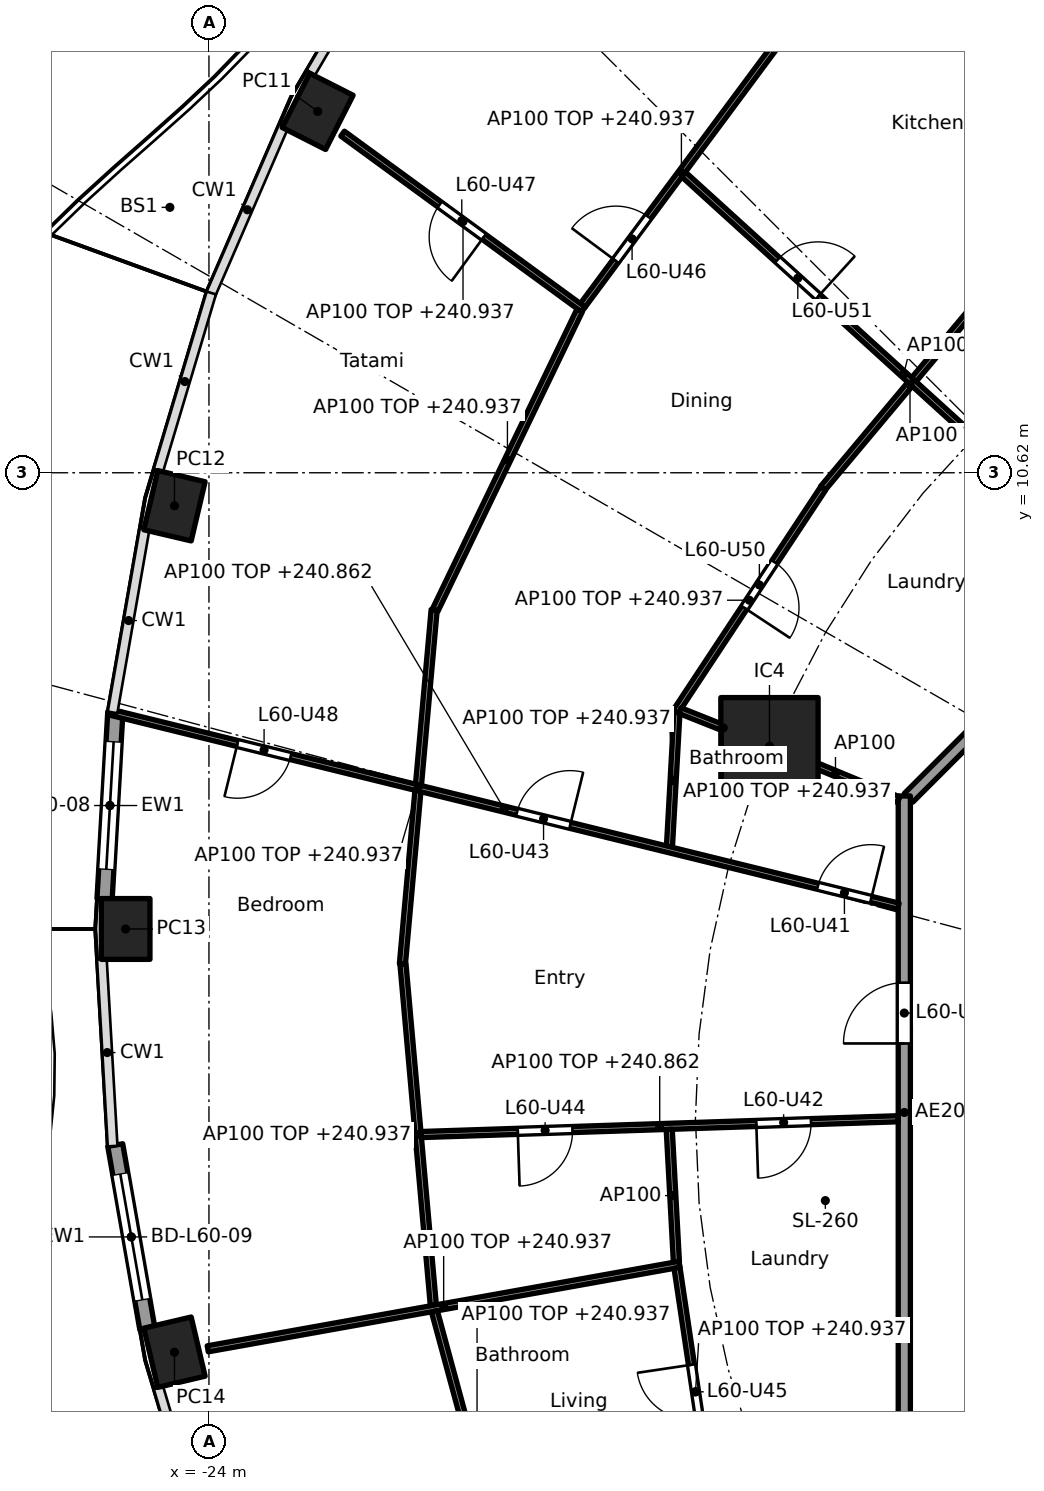
"""IFC4 building model, lengths in metres.
Left out: names, types, materials, properties, quantities, classifications, styles, units other than length and angle.
Written with IfcOpenShell. Run it as: python <this file> out.ifc"""

import sys

from ifc_helpers import new_model, si_unit, direction, frame, frame_2d, origin, origin_2d, place, context, subcontext, project, spatial, rectangle, hollow_rectangle, extrude, element, fill, save


model = new_model("IFC4")
c1 = context("Model", 3, precision=1e-05, world=origin(), true_north=direction((0.0, 1.0)))
c2 = subcontext(c1, "Body", "Model", "MODEL_VIEW")
j1 = project(units=[si_unit("LENGTHUNIT", "METRE"), si_unit("PLANEANGLEUNIT", "RADIAN")], contexts=[c1])
p1 = place(None, origin())
s1 = spatial("IfcSite", under=j1, at=p1, CompositionType="ELEMENT")
p2 = place(p1, origin())
s2 = spatial("IfcBuilding", under=s1, at=p2, CompositionType="ELEMENT")
p3 = place(p2, frame((0.0, 0.0, 238.1)))
s3 = spatial("IfcBuildingStorey", under=s2, at=p3, CompositionType="ELEMENT", Elevation=238.1)
for number, where, z_axis, x_axis in (
    (1, (-22.212, 16.563, 0.0), (0.0, 0.0, 1.0), (-0.452, -0.892, 0.0)),
    (2, (-24.567, 10.077, 0.0), (0.0, 0.0, 1.0), (-0.229, -0.973, 0.0)),
    (3, (-25.37, 3.118, 0.0), (0.0, 0.0, 1.0), (0.0, -1.0, 0.0)),
    (4, (-24.567, -3.842, 0.0), (0.0, 0.0, 1.0), (0.229, -0.973, 0.0)),
):
    element("IfcColumn", number, at=place(p3, frame(where, z_axis=z_axis, x_axis=x_axis)), inside=s3, PredefinedType="COLUMN", context=c2, shape_type="SweptSolid", body=[
        extrude(hollow_rectangle(XDim=1.0, YDim=0.8, WallThickness=0.032, at=origin_2d()), origin(), (0.0, 0.0, 1.0), 3.7),
    ])
p4 = place(p3, frame((-14.782, 6.123, 0.0), z_axis=(0.0, 0.0, 1.0), x_axis=(1.0, 0.0, 0.0)))
e5 = element("IfcColumn", 5, at=p4, inside=s3, PredefinedType="COLUMN", context=c2, shape_type="SweptSolid", body=[
    extrude(rectangle(XDim=1.6, YDim=1.6, at=origin_2d()), origin(), (0.0, 0.0, 1.0), 3.7),
])
p5 = place(p3, frame((-25.717, 3.61, 0.0), z_axis=(0.0, 0.0, 1.0), x_axis=(0.057528189427, 0.998343882348, 0.0)))
e6 = element("IfcWall", 6, at=p5, inside=s3, PredefinedType="SOLIDWALL", context=c2, shape_type="SweptSolid", body=[
    extrude(rectangle(XDim=3.081, YDim=0.25, at=frame_2d((1.541, 0.0))), origin(), (0.0, 0.0, 1.0), 3.44),
])
p6 = place(p5, frame((0.49, 0.0, 0.0)))
e7 = element("IfcOpeningElement", 7, at=p6, cuts=e6, PredefinedType="OPENING", context=c2, shape_type="SweptSolid", body=[
    extrude(rectangle(XDim=2.1, YDim=2.4, at=frame_2d((1.05, 1.2))), frame((0.0, 0.135, 0.0), z_axis=(0.0, -1.0, 0.0), x_axis=(1.0, 0.0, 0.0)), (0.0, 0.0, 1.0), 0.27),
])
p7 = place(p3, frame((-25.013, -3.457, 0.0), z_axis=(0.0, 0.0, 1.0), x_axis=(-0.172241318156, 0.985054784426, 0.0)))
e8 = element("IfcWall", 8, at=p7, inside=s3, PredefinedType="SOLIDWALL", context=c2, shape_type="SweptSolid", body=[
    extrude(rectangle(XDim=3.067, YDim=0.25, at=frame_2d((1.534, 0.0))), origin(), (0.0, 0.0, 1.0), 3.44),
])
p8 = place(p7, frame((0.484, 0.0, 0.0)))
e9 = element("IfcOpeningElement", 9, at=p8, cuts=e8, PredefinedType="OPENING", context=c2, shape_type="SweptSolid", body=[
    extrude(rectangle(XDim=2.1, YDim=2.4, at=frame_2d((1.05, 1.2))), frame((0.0, 0.135, 0.0), z_axis=(0.0, -1.0, 0.0), x_axis=(1.0, 0.0, 0.0)), (0.0, 0.0, 1.0), 0.27),
])
p9 = place(p3, frame((-6.15, 14.824, 0.0), z_axis=(0.0, 0.0, 1.0), x_axis=(-0.538870687577, 0.842388498301, 0.0)))
e10 = element("IfcWall", 10, at=p9, inside=s3, PredefinedType="PARTITIONING", context=c2, shape_type="SweptSolid", body=[
    extrude(rectangle(XDim=13.213, YDim=0.2, at=frame_2d((6.606, 0.0))), origin(), (0.0, 0.0, 1.0), 2.837),
])
p10 = place(p3, frame((-5.275, 12.494, 0.0), z_axis=(0.0, 0.0, 1.0), x_axis=(-0.707106781187, -0.707106781187, 0.0)))
e11 = element("IfcWall", 11, at=p10, inside=s3, PredefinedType="PARTITIONING", context=c2, shape_type="SweptSolid", body=[
    extrude(rectangle(XDim=10.209, YDim=0.2, at=frame_2d((5.104, 0.0))), origin(), (0.0, 0.0, 1.0), 3.44),
])
p11 = place(p3, frame((-12.565, 5.304, 0.0), z_axis=(0.0, 0.0, 1.0), x_axis=(0.0, -1.0, 0.0)))
e12 = element("IfcWall", 12, at=p11, inside=s3, PredefinedType="PARTITIONING", context=c2, shape_type="SweptSolid", body=[
    extrude(rectangle(XDim=10.409, YDim=0.2, at=frame_2d((5.205, 0.0))), origin(), (0.0, 0.0, 1.0), 3.44),
])
p12 = place(p11, frame((3.07, 0.0, 0.0)))
e13 = element("IfcOpeningElement", 13, at=p12, cuts=e12, PredefinedType="OPENING", context=c2, shape_type="SweptSolid", body=[
    extrude(rectangle(XDim=1.0, YDim=2.1, at=frame_2d((0.5, 1.05))), frame((0.0, 0.11, 0.0), z_axis=(0.0, -1.0, 0.0), x_axis=(1.0, 0.0, 0.0)), (0.0, 0.0, 1.0), 0.22),
])
p13 = place(p3, frame((-11.039, 13.785, 0.0), z_axis=(0.0, 0.0, 1.0), x_axis=(-0.642254625966, -0.766491353784, 0.0)))
e14 = element("IfcWall", 14, at=p13, inside=s3, PredefinedType="PARTITIONING", context=c2, shape_type="SweptSolid", body=[
    extrude(rectangle(XDim=4.461, YDim=0.1, at=frame_2d((2.23, 0.0))), origin(), (0.0, 0.0, 1.0), 2.837),
])
p14 = place(p3, frame((-14.608, 17.743, 0.0), z_axis=(0.0, 0.0, 1.0), x_axis=(-0.596174489482, -0.8028548923, 0.0)))
e15 = element("IfcWall", 15, at=p14, inside=s3, PredefinedType="PARTITIONING", context=c2, shape_type="SweptSolid", body=[
    extrude(rectangle(XDim=5.442, YDim=0.1, at=frame_2d((2.721, 0.0))), origin(), (0.0, 0.0, 1.0), 2.837),
])
p15 = place(p14, frame((3.631, 0.0, 0.0)))
e16 = element("IfcOpeningElement", 16, at=p15, cuts=e15, PredefinedType="OPENING", context=c2, shape_type="SweptSolid", body=[
    extrude(rectangle(XDim=0.9, YDim=2.1, at=frame_2d((0.45, 1.05))), frame((0.0, 0.06, 0.0), z_axis=(0.0, -1.0, 0.0), x_axis=(1.0, 0.0, 0.0)), (0.0, 0.0, 1.0), 0.12),
])
p16 = place(p3, frame((-8.959, 8.952, 0.0), z_axis=(0.0, 0.0, 1.0), x_axis=(-0.740140081805, 0.672452719011, 0.0)))
e17 = element("IfcWall", 17, at=p16, inside=s3, PredefinedType="PARTITIONING", context=c2, shape_type="SweptSolid", body=[
    extrude(rectangle(XDim=9.775, YDim=0.1, at=frame_2d((4.887, 0.0))), origin(), (0.0, 0.0, 1.0), 2.762),
])
p17 = place(p16, frame((6.789, 0.0, 0.0)))
e18 = element("IfcOpeningElement", 18, at=p17, cuts=e17, PredefinedType="OPENING", context=c2, shape_type="SweptSolid", body=[
    extrude(rectangle(XDim=0.9, YDim=2.1, at=frame_2d((0.45, 1.05))), frame((0.0, 0.06, 0.0), z_axis=(0.0, -1.0, 0.0), x_axis=(1.0, 0.0, 0.0)), (0.0, 0.0, 1.0), 0.12),
])
p18 = place(p3, frame((-13.899, 10.363, 0.0), z_axis=(0.0, 0.0, 1.0), x_axis=(-0.55129513787, -0.834310296569, 0.0)))
e19 = element("IfcWall", 19, at=p18, inside=s3, PredefinedType="PARTITIONING", context=c2, shape_type="SweptSolid", body=[
    extrude(rectangle(XDim=4.407, YDim=0.1, at=frame_2d((2.204, 0.0))), origin(), (0.0, 0.0, 1.0), 2.837),
])
p19 = place(p18, frame((1.453, 0.0, 0.0)))
e20 = element("IfcOpeningElement", 20, at=p19, cuts=e19, PredefinedType="OPENING", context=c2, shape_type="SweptSolid", body=[
    extrude(rectangle(XDim=0.9, YDim=2.1, at=frame_2d((0.45, 1.05))), frame((0.0, 0.06, 0.0), z_axis=(0.0, -1.0, 0.0), x_axis=(1.0, 0.0, 0.0)), (0.0, 0.0, 1.0), 0.12),
])
p20 = place(p3, frame((-17.842, 13.304, 0.0), z_axis=(0.0, 0.0, 1.0), x_axis=(-0.807541617862, 0.589810592835, 0.0)))
e21 = element("IfcWall", 21, at=p20, inside=s3, PredefinedType="PARTITIONING", context=c2, shape_type="SweptSolid", body=[
    extrude(rectangle(XDim=4.903, YDim=0.1, at=frame_2d((2.452, 0.0))), origin(), (0.0, 0.0, 1.0), 2.837),
])
p21 = place(p20, frame((2.027, 0.0, 0.0)))
e22 = element("IfcOpeningElement", 22, at=p21, cuts=e21, PredefinedType="OPENING", context=c2, shape_type="SweptSolid", body=[
    extrude(rectangle(XDim=0.9, YDim=2.1, at=frame_2d((0.45, 1.05))), frame((0.0, 0.06, 0.0), z_axis=(0.0, -1.0, 0.0), x_axis=(1.0, 0.0, 0.0)), (0.0, 0.0, 1.0), 0.12),
])
p22 = place(p3, frame((-17.904, 13.289, 0.0), z_axis=(0.0, 0.0, 1.0), x_axis=(-0.434292070406, -0.900772111903, 0.0)))
e23 = element("IfcWall", 23, at=p22, inside=s3, PredefinedType="PARTITIONING", context=c2, shape_type="SweptSolid", body=[
    extrude(rectangle(XDim=5.469, YDim=0.1, at=frame_2d((2.734, 0.0))), origin(), (0.0, 0.0, 1.0), 2.837),
])
p23 = place(p3, frame((-12.657, 5.243, 0.0), z_axis=(0.0, 0.0, 1.0), x_axis=(-0.923864733477, 0.382719158442, 0.0)))
e24 = element("IfcWall", 24, at=p23, inside=s3, PredefinedType="PARTITIONING", context=c2, shape_type="SweptSolid", body=[
    extrude(rectangle(XDim=2.25, YDim=0.1, at=frame_2d((1.125, 0.0))), origin(), (0.0, 0.0, 1.0), 3.44),
])
p24 = place(p3, frame((-14.829, 6.141, 0.0), z_axis=(0.0, 0.0, 1.0), x_axis=(-0.929177051194, 0.369634965248, 0.0)))
e25 = element("IfcWall", 25, at=p24, inside=s3, PredefinedType="PARTITIONING", context=c2, shape_type="SweptSolid", body=[
    extrude(rectangle(XDim=1.535, YDim=0.1, at=frame_2d((0.768, 0.0))), origin(), (0.0, 0.0, 1.0), 2.837),
])
p25 = place(p3, frame((-16.304, 6.677, 0.0), z_axis=(0.0, 0.0, 1.0), x_axis=(-0.055638870195, -0.998450958297, 0.0)))
e26 = element("IfcWall", 26, at=p25, inside=s3, PredefinedType="PARTITIONING", context=c2, shape_type="SweptSolid", body=[
    extrude(rectangle(XDim=2.242, YDim=0.1, at=frame_2d((1.121, 0.0))), origin(), (0.0, 0.0, 1.0), 2.837),
])
p26 = place(p3, frame((-20.296, 8.368, 0.0), z_axis=(0.0, 0.0, 1.0), x_axis=(-0.08928986402, -0.996005682807, 0.0)))
e27 = element("IfcWall", 27, at=p26, inside=s3, PredefinedType="PARTITIONING", context=c2, shape_type="SweptSolid", body=[
    extrude(rectangle(XDim=5.849, YDim=0.1, at=frame_2d((2.924, 0.0))), origin(), (0.0, 0.0, 1.0), 2.837),
])
p27 = place(p3, frame((-12.662, 3.494, 0.0), z_axis=(0.0, 0.0, 1.0), x_axis=(-0.971037272035, 0.238928056784, 0.0)))
e28 = element("IfcWall", 28, at=p27, inside=s3, PredefinedType="PARTITIONING", context=c2, shape_type="SweptSolid", body=[
    extrude(rectangle(XDim=13.35, YDim=0.1, at=frame_2d((6.675, 0.0))), origin(), (0.0, 0.0, 1.0), 2.762),
])
p28 = place(p27, frame((0.464, 0.0, 0.0)))
e29 = element("IfcOpeningElement", 29, at=p28, cuts=e28, PredefinedType="OPENING", context=c2, shape_type="SweptSolid", body=[
    extrude(rectangle(XDim=0.9, YDim=2.1, at=frame_2d((0.45, 1.05))), frame((0.0, 0.06, 0.0), z_axis=(0.0, -1.0, 0.0), x_axis=(1.0, 0.0, 0.0)), (0.0, 0.0, 1.0), 0.12),
])
p29 = place(p27, frame((5.56, 0.0, 0.0)))
e30 = element("IfcOpeningElement", 30, at=p29, cuts=e28, PredefinedType="OPENING", context=c2, shape_type="SweptSolid", body=[
    extrude(rectangle(XDim=0.9, YDim=2.1, at=frame_2d((0.45, 1.05))), frame((0.0, 0.06, 0.0), z_axis=(0.0, -1.0, 0.0), x_axis=(1.0, 0.0, 0.0)), (0.0, 0.0, 1.0), 0.12),
])
p30 = place(p27, frame((10.293, 0.0, 0.0)))
e31 = element("IfcOpeningElement", 31, at=p30, cuts=e28, PredefinedType="OPENING", context=c2, shape_type="SweptSolid", body=[
    extrude(rectangle(XDim=0.9, YDim=2.1, at=frame_2d((0.45, 1.05))), frame((0.0, 0.06, 0.0), z_axis=(0.0, -1.0, 0.0), x_axis=(1.0, 0.0, 0.0)), (0.0, 0.0, 1.0), 0.12),
])
p31 = place(p3, frame((-20.81, 2.542, 0.0), z_axis=(0.0, 0.0, 1.0), x_axis=(0.088621920298, -0.996065336834, 0.0)))
e32 = element("IfcWall", 32, at=p31, inside=s3, PredefinedType="PARTITIONING", context=c2, shape_type="SweptSolid", body=[
    extrude(rectangle(XDim=5.636, YDim=0.1, at=frame_2d((2.818, 0.0))), origin(), (0.0, 0.0, 1.0), 2.837),
])
p32 = place(p3, frame((-12.665, -0.003, 0.0), z_axis=(0.0, 0.0, 1.0), x_axis=(-0.999453263957, -0.033063169315, 0.0)))
e33 = element("IfcWall", 33, at=p32, inside=s3, PredefinedType="PARTITIONING", context=c2, shape_type="SweptSolid", body=[
    extrude(rectangle(XDim=7.849, YDim=0.1, at=frame_2d((3.925, 0.0))), origin(), (0.0, 0.0, 1.0), 2.762),
])
p33 = place(p32, frame((1.435, 0.0, 0.0)))
e34 = element("IfcOpeningElement", 34, at=p33, cuts=e33, PredefinedType="OPENING", context=c2, shape_type="SweptSolid", body=[
    extrude(rectangle(XDim=0.9, YDim=2.1, at=frame_2d((0.45, 1.05))), frame((0.0, 0.06, 0.0), z_axis=(0.0, -1.0, 0.0), x_axis=(1.0, 0.0, 0.0)), (0.0, 0.0, 1.0), 0.12),
])
p34 = place(p32, frame((5.36, 0.0, 0.0)))
e35 = element("IfcOpeningElement", 35, at=p34, cuts=e33, PredefinedType="OPENING", context=c2, shape_type="SweptSolid", body=[
    extrude(rectangle(XDim=0.9, YDim=2.1, at=frame_2d((0.45, 1.05))), frame((0.0, 0.06, 0.0), z_axis=(0.0, -1.0, 0.0), x_axis=(1.0, 0.0, 0.0)), (0.0, 0.0, 1.0), 0.12),
])
p35 = place(p3, frame((-16.431, -0.178, 0.0), z_axis=(0.0, 0.0, 1.0), x_axis=(0.053951127036, -0.998543577362, 0.0)))
e36 = element("IfcWall", 36, at=p35, inside=s3, PredefinedType="PARTITIONING", context=c2, shape_type="SweptSolid", body=[
    extrude(rectangle(XDim=2.181, YDim=0.1, at=frame_2d((1.091, 0.0))), origin(), (0.0, 0.0, 1.0), 3.44),
])
p36 = place(p3, frame((-16.261, -2.397, 0.0), z_axis=(0.0, 0.0, 1.0), x_axis=(-0.984329983721, -0.17633627859, 0.0)))
e37 = element("IfcWall", 37, at=p36, inside=s3, PredefinedType="PARTITIONING", context=c2, shape_type="SweptSolid", body=[
    extrude(rectangle(XDim=7.882, YDim=0.1, at=frame_2d((3.941, 0.0))), origin(), (0.0, 0.0, 1.0), 2.837),
])
p37 = place(p3, frame((-16.303, -2.455, 0.0), z_axis=(0.0, 0.0, 1.0), x_axis=(0.147711951447, -0.9890304239, 0.0)))
e38 = element("IfcWall", 38, at=p37, inside=s3, PredefinedType="PARTITIONING", context=c2, shape_type="SweptSolid", body=[
    extrude(rectangle(XDim=4.122, YDim=0.1, at=frame_2d((2.061, 0.0))), origin(), (0.0, 0.0, 1.0), 2.837),
])
p38 = place(p37, frame((1.611, 0.0, 0.0)))
e39 = element("IfcOpeningElement", 39, at=p38, cuts=e38, PredefinedType="OPENING", context=c2, shape_type="SweptSolid", body=[
    extrude(rectangle(XDim=0.9, YDim=2.1, at=frame_2d((0.45, 1.05))), frame((0.0, 0.06, 0.0), z_axis=(0.0, -1.0, 0.0), x_axis=(1.0, 0.0, 0.0)), (0.0, 0.0, 1.0), 0.12),
])
p39 = place(p3, frame((-20.292, -3.17, 0.0), z_axis=(0.0, 0.0, 1.0), x_axis=(0.26187906236, -0.965100697698, 0.0)))
e40 = element("IfcWall", 40, at=p39, inside=s3, PredefinedType="PARTITIONING", context=c2, shape_type="SweptSolid", body=[
    extrude(rectangle(XDim=5.356, YDim=0.1, at=frame_2d((2.678, 0.0))), origin(), (0.0, 0.0, 1.0), 2.837),
])
p40 = place(p39, frame((2.228, 0.0, 0.0)))
e41 = element("IfcOpeningElement", 41, at=p40, cuts=e40, PredefinedType="OPENING", context=c2, shape_type="SweptSolid", body=[
    extrude(rectangle(XDim=0.9, YDim=2.1, at=frame_2d((0.45, 1.05))), frame((0.0, 0.06, 0.0), z_axis=(0.0, -1.0, 0.0), x_axis=(1.0, 0.0, 0.0)), (0.0, 0.0, 1.0), 0.12),
])
p41 = place(p6, origin())
e42 = element("IfcDoor", 42, at=p41, inside=s3, OperationType="SLIDING_TO_LEFT", PredefinedType="DOOR", context=c2, shape_type="SweptSolid", body=[
    extrude(rectangle(XDim=2.1, YDim=2.4, at=frame_2d((1.05, 1.2))), frame((0.0, 0.025, 0.0), z_axis=(0.0, -1.0, 0.0), x_axis=(1.0, 0.0, 0.0)), (0.0, 0.0, 1.0), 0.05),
])
fill(e7, e42)
p42 = place(p8, origin())
e43 = element("IfcDoor", 43, at=p42, inside=s3, OperationType="SLIDING_TO_LEFT", PredefinedType="DOOR", context=c2, shape_type="SweptSolid", body=[
    extrude(rectangle(XDim=2.1, YDim=2.4, at=frame_2d((1.05, 1.2))), frame((0.0, 0.025, 0.0), z_axis=(0.0, -1.0, 0.0), x_axis=(1.0, 0.0, 0.0)), (0.0, 0.0, 1.0), 0.05),
])
fill(e9, e43)
p43 = place(p12, frame((1.0, 0.0, 0.0), x_axis=(-1.0, 0.0, 0.0)))
e44 = element("IfcDoor", 44, at=p43, inside=s3, OperationType="SINGLE_SWING_LEFT", PredefinedType="DOOR", context=c2, shape_type="SweptSolid", body=[
    extrude(rectangle(XDim=1.0, YDim=2.1, at=frame_2d((0.5, 1.05))), frame((0.0, 0.025, 0.0), z_axis=(0.0, -1.0, 0.0), x_axis=(1.0, 0.0, 0.0)), (0.0, 0.0, 1.0), 0.05),
])
fill(e13, e44)
p44 = place(p28, frame((0.9, 0.0, 0.0), x_axis=(-1.0, 0.0, 0.0)))
e45 = element("IfcDoor", 45, at=p44, inside=s3, OperationType="SINGLE_SWING_RIGHT", PredefinedType="DOOR", context=c2, shape_type="SweptSolid", body=[
    extrude(rectangle(XDim=0.9, YDim=2.1, at=frame_2d((0.45, 1.05))), frame((0.0, 0.025, 0.0), z_axis=(0.0, -1.0, 0.0), x_axis=(1.0, 0.0, 0.0)), (0.0, 0.0, 1.0), 0.05),
])
fill(e29, e45)
p45 = place(p33, origin())
e46 = element("IfcDoor", 46, at=p45, inside=s3, OperationType="SINGLE_SWING_RIGHT", PredefinedType="DOOR", context=c2, shape_type="SweptSolid", body=[
    extrude(rectangle(XDim=0.9, YDim=2.1, at=frame_2d((0.45, 1.05))), frame((0.0, 0.025, 0.0), z_axis=(0.0, -1.0, 0.0), x_axis=(1.0, 0.0, 0.0)), (0.0, 0.0, 1.0), 0.05),
])
fill(e34, e46)
p46 = place(p29, frame((0.9, 0.0, 0.0), x_axis=(-1.0, 0.0, 0.0)))
e47 = element("IfcDoor", 47, at=p46, inside=s3, OperationType="SINGLE_SWING_RIGHT", PredefinedType="DOOR", context=c2, shape_type="SweptSolid", body=[
    extrude(rectangle(XDim=0.9, YDim=2.1, at=frame_2d((0.45, 1.05))), frame((0.0, 0.025, 0.0), z_axis=(0.0, -1.0, 0.0), x_axis=(1.0, 0.0, 0.0)), (0.0, 0.0, 1.0), 0.05),
])
fill(e30, e47)
p47 = place(p34, origin())
e48 = element("IfcDoor", 48, at=p47, inside=s3, OperationType="SINGLE_SWING_RIGHT", PredefinedType="DOOR", context=c2, shape_type="SweptSolid", body=[
    extrude(rectangle(XDim=0.9, YDim=2.1, at=frame_2d((0.45, 1.05))), frame((0.0, 0.025, 0.0), z_axis=(0.0, -1.0, 0.0), x_axis=(1.0, 0.0, 0.0)), (0.0, 0.0, 1.0), 0.05),
])
fill(e35, e48)
p48 = place(p38, frame((0.9, 0.0, 0.0), x_axis=(-1.0, 0.0, 0.0)))
e49 = element("IfcDoor", 49, at=p48, inside=s3, OperationType="SINGLE_SWING_RIGHT", PredefinedType="DOOR", context=c2, shape_type="SweptSolid", body=[
    extrude(rectangle(XDim=0.9, YDim=2.1, at=frame_2d((0.45, 1.05))), frame((0.0, 0.025, 0.0), z_axis=(0.0, -1.0, 0.0), x_axis=(1.0, 0.0, 0.0)), (0.0, 0.0, 1.0), 0.05),
])
fill(e39, e49)
p49 = place(p15, frame((0.9, 0.0, 0.0), x_axis=(-1.0, 0.0, 0.0)))
e50 = element("IfcDoor", 50, at=p49, inside=s3, OperationType="SINGLE_SWING_LEFT", PredefinedType="DOOR", context=c2, shape_type="SweptSolid", body=[
    extrude(rectangle(XDim=0.9, YDim=2.1, at=frame_2d((0.45, 1.05))), frame((0.0, 0.025, 0.0), z_axis=(0.0, -1.0, 0.0), x_axis=(1.0, 0.0, 0.0)), (0.0, 0.0, 1.0), 0.05),
])
fill(e16, e50)
p50 = place(p21, origin())
e51 = element("IfcDoor", 51, at=p50, inside=s3, OperationType="SINGLE_SWING_LEFT", PredefinedType="DOOR", context=c2, shape_type="SweptSolid", body=[
    extrude(rectangle(XDim=0.9, YDim=2.1, at=frame_2d((0.45, 1.05))), frame((0.0, 0.025, 0.0), z_axis=(0.0, -1.0, 0.0), x_axis=(1.0, 0.0, 0.0)), (0.0, 0.0, 1.0), 0.05),
])
fill(e22, e51)
p51 = place(p30, origin())
e52 = element("IfcDoor", 52, at=p51, inside=s3, OperationType="SINGLE_SWING_RIGHT", PredefinedType="DOOR", context=c2, shape_type="SweptSolid", body=[
    extrude(rectangle(XDim=0.9, YDim=2.1, at=frame_2d((0.45, 1.05))), frame((0.0, 0.025, 0.0), z_axis=(0.0, -1.0, 0.0), x_axis=(1.0, 0.0, 0.0)), (0.0, 0.0, 1.0), 0.05),
])
fill(e31, e52)
p52 = place(p19, origin())
e53 = element("IfcDoor", 53, at=p52, inside=s3, OperationType="SINGLE_SWING_RIGHT", PredefinedType="DOOR", context=c2, shape_type="SweptSolid", body=[
    extrude(rectangle(XDim=0.9, YDim=2.1, at=frame_2d((0.45, 1.05))), frame((0.0, 0.025, 0.0), z_axis=(0.0, -1.0, 0.0), x_axis=(1.0, 0.0, 0.0)), (0.0, 0.0, 1.0), 0.05),
])
fill(e20, e53)
p53 = place(p17, frame((0.9, 0.0, 0.0), x_axis=(-1.0, 0.0, 0.0)))
e54 = element("IfcDoor", 54, at=p53, inside=s3, OperationType="SINGLE_SWING_RIGHT", PredefinedType="DOOR", context=c2, shape_type="SweptSolid", body=[
    extrude(rectangle(XDim=0.9, YDim=2.1, at=frame_2d((0.45, 1.05))), frame((0.0, 0.025, 0.0), z_axis=(0.0, -1.0, 0.0), x_axis=(1.0, 0.0, 0.0)), (0.0, 0.0, 1.0), 0.05),
])
fill(e18, e54)
save(model, sys.argv[1])
